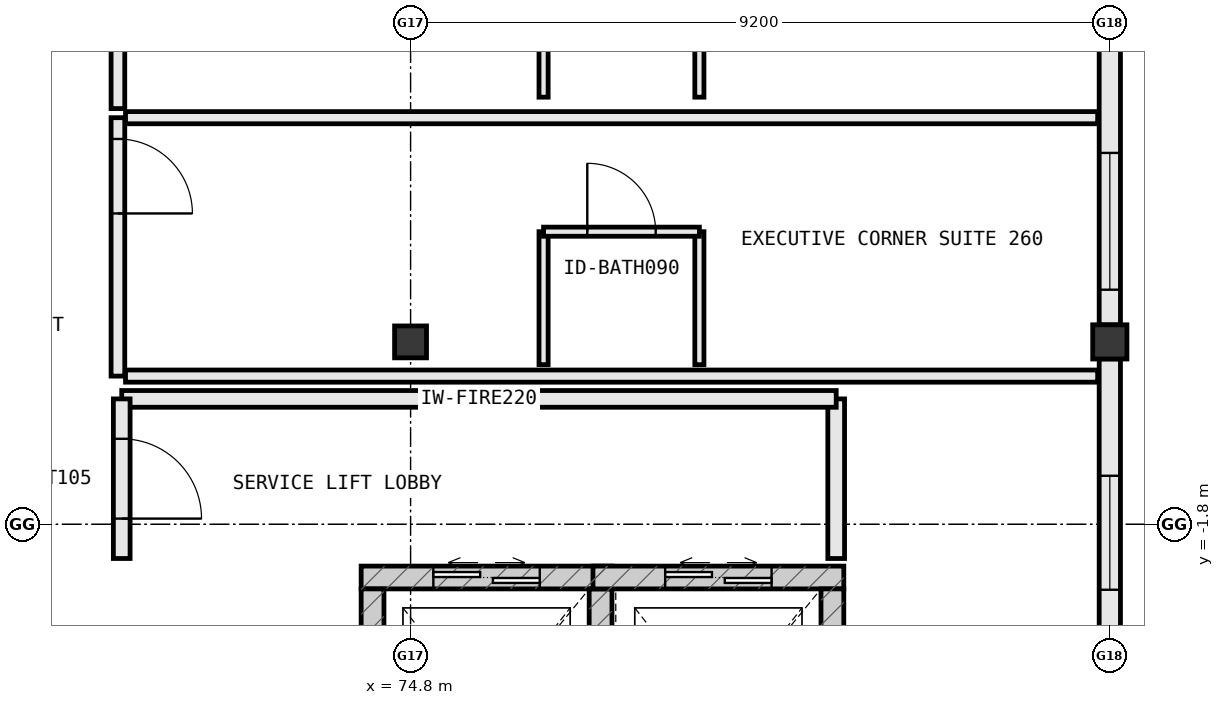
"""IFC4 building model, lengths in metres.
Left out: names, types, materials, properties, quantities, classifications, styles, units other than length and angle.
Written with IfcOpenShell. Run it as: python <this file> out.ifc"""

import sys

from ifc_helpers import new_model, si_unit, direction, frame, frame_2d, origin, origin_2d, place, context, subcontext, project, spatial, rectangle, extrude, element, fill, save


model = new_model("IFC4")
c1 = context("Model", 3, precision=1e-05, world=origin(), true_north=direction((0.0, 1.0)))
c2 = subcontext(c1, "Body", "Model", "MODEL_VIEW")
j1 = project(units=[si_unit("LENGTHUNIT", "METRE"), si_unit("PLANEANGLEUNIT", "RADIAN")], contexts=[c1])
p1 = place(None, origin())
s1 = spatial("IfcSite", under=j1, at=p1, CompositionType="ELEMENT")
p2 = place(p1, origin())
s2 = spatial("IfcBuilding", under=s1, at=p2, CompositionType="ELEMENT")
p3 = place(p2, frame((0.0, 0.0, 39.0)))
s3 = spatial("IfcBuildingStorey", under=s2, at=p3, CompositionType="ELEMENT", Elevation=39.0)
p4 = place(p3, frame((74.8, 0.6, 0.0), z_axis=(0.0, 0.0, 1.0), x_axis=(1.0, 0.0, 0.0)))
e1 = element("IfcColumn", 1, at=p4, inside=s3, PredefinedType="COLUMN", context=c2, shape_type="SweptSolid", body=[
    extrude(rectangle(XDim=0.42, YDim=0.42, at=origin_2d()), origin(), (0.0, 0.0, 1.0), 3.8),
])
p5 = place(p3, frame((84.0, 0.6, 0.0), z_axis=(0.0, 0.0, 1.0), x_axis=(1.0, 0.0, 0.0)))
e2 = element("IfcColumn", 2, at=p5, inside=s3, PredefinedType="COLUMN", context=c2, shape_type="SweptSolid", body=[
    extrude(rectangle(XDim=0.45, YDim=0.45, at=origin_2d()), origin(), (0.0, 0.0, 1.0), 3.8),
])
p6 = place(p3, frame((84.0, -8.777, 0.0), z_axis=(0.0, 0.0, 1.0), x_axis=(0.0, 1.0, 0.0)))
e3 = element("IfcWall", 3, at=p6, inside=s3, PredefinedType="STANDARD", context=c2, shape_type="SweptSolid", body=[
    extrude(rectangle(XDim=9.154, YDim=0.28, at=frame_2d((4.577, 0.0))), origin(), (0.0, 0.0, 1.0), 2.98),
])
p7 = place(p6, frame((1.539, 0.0, 0.85)))
e4 = element("IfcOpeningElement", 4, at=p7, cuts=e3, PredefinedType="OPENING", context=c2, shape_type="SweptSolid", body=[
    extrude(rectangle(XDim=1.5, YDim=1.75, at=frame_2d((0.75, 0.875))), frame((0.0, 0.152, 0.0), z_axis=(0.0, -1.0, 0.0), x_axis=(1.0, 0.0, 0.0)), (0.0, 0.0, 1.0), 0.304),
])
p8 = place(p6, frame((6.115, 0.0, 0.85)))
e5 = element("IfcOpeningElement", 5, at=p8, cuts=e3, PredefinedType="OPENING", context=c2, shape_type="SweptSolid", body=[
    extrude(rectangle(XDim=1.5, YDim=1.75, at=frame_2d((0.75, 0.875))), frame((0.0, 0.152, 0.0), z_axis=(0.0, -1.0, 0.0), x_axis=(1.0, 0.0, 0.0)), (0.0, 0.0, 1.0), 0.304),
])
p9 = place(p3, frame((84.0, 0.823, 0.0), z_axis=(0.0, 0.0, 1.0), x_axis=(0.0, 1.0, 0.0)))
e6 = element("IfcWall", 6, at=p9, inside=s3, PredefinedType="STANDARD", context=c2, shape_type="SweptSolid", body=[
    extrude(rectangle(XDim=9.154, YDim=0.28, at=frame_2d((4.577, 0.0))), origin(), (0.0, 0.0, 1.0), 2.98),
])
p10 = place(p9, frame((0.463, 0.0, 0.85)))
e7 = element("IfcOpeningElement", 7, at=p10, cuts=e6, PredefinedType="OPENING", context=c2, shape_type="SweptSolid", body=[
    extrude(rectangle(XDim=1.8, YDim=1.85, at=frame_2d((0.9, 0.925))), frame((0.0, 0.152, 0.0), z_axis=(0.0, -1.0, 0.0), x_axis=(1.0, 0.0, 0.0)), (0.0, 0.0, 1.0), 0.304),
])
p11 = place(p9, frame((3.647, 0.0, 0.85)))
e8 = element("IfcOpeningElement", 8, at=p11, cuts=e6, PredefinedType="OPENING", context=c2, shape_type="SweptSolid", body=[
    extrude(rectangle(XDim=1.8, YDim=1.85, at=frame_2d((0.9, 0.925))), frame((0.0, 0.152, 0.0), z_axis=(0.0, -1.0, 0.0), x_axis=(1.0, 0.0, 0.0)), (0.0, 0.0, 1.0), 0.304),
])
p12 = place(p9, frame((6.861, 0.0, 0.85)))
e9 = element("IfcOpeningElement", 9, at=p12, cuts=e6, PredefinedType="OPENING", context=c2, shape_type="SweptSolid", body=[
    extrude(rectangle(XDim=1.8, YDim=1.85, at=frame_2d((0.9, 0.925))), frame((0.0, 0.152, 0.0), z_axis=(0.0, -1.0, 0.0), x_axis=(1.0, 0.0, 0.0)), (0.0, 0.0, 1.0), 0.304),
])
p13 = place(p3, frame((77.45, -2.5, 0.0), z_axis=(0.0, 0.0, 1.0), x_axis=(-1.0, 0.0, 0.0)))
e10 = element("IfcWall", 10, at=p13, inside=s3, PredefinedType="SHEAR", context=c2, shape_type="SweptSolid", body=[
    extrude(rectangle(XDim=3.3, YDim=0.3, at=frame_2d((1.65, 0.0))), origin(), (0.0, 0.0, 1.0), 3.8),
])
p14 = place(p13, frame((0.95, 0.0, 0.0)))
e11 = element("IfcOpeningElement", 11, at=p14, cuts=e10, PredefinedType="OPENING", context=c2, shape_type="SweptSolid", body=[
    extrude(rectangle(XDim=1.4, YDim=2.2, at=frame_2d((0.7, 1.1))), frame((0.0, 0.162, 0.0), z_axis=(0.0, -1.0, 0.0), x_axis=(1.0, 0.0, 0.0)), (0.0, 0.0, 1.0), 0.324),
])
for number, where, z_axis, x_axis in (
    (12, (77.3, -5.95, 0.0), (0.0, 0.0, 1.0), (0.0, 1.0, 0.0)),
    (13, (74.3, -2.65, 0.0), (0.0, 0.0, 1.0), (0.0, -1.0, 0.0)),
):
    element("IfcWall", number, at=place(p3, frame(where, z_axis=z_axis, x_axis=x_axis)), inside=s3, PredefinedType="SHEAR", context=c2, shape_type="SweptSolid", body=[
        extrude(rectangle(XDim=3.3, YDim=0.3, at=frame_2d((1.65, 0.0))), origin(), (0.0, 0.0, 1.0), 3.8),
    ])
p15 = place(p3, frame((80.5, -2.5, 0.0), z_axis=(0.0, 0.0, 1.0), x_axis=(-1.0, 0.0, 0.0)))
e14 = element("IfcWall", 14, at=p15, inside=s3, PredefinedType="SHEAR", context=c2, shape_type="SweptSolid", body=[
    extrude(rectangle(XDim=3.3, YDim=0.3, at=frame_2d((1.65, 0.0))), origin(), (0.0, 0.0, 1.0), 3.8),
])
p16 = place(p15, frame((0.95, 0.0, 0.0)))
e15 = element("IfcOpeningElement", 15, at=p16, cuts=e14, PredefinedType="OPENING", context=c2, shape_type="SweptSolid", body=[
    extrude(rectangle(XDim=1.4, YDim=2.2, at=frame_2d((0.7, 1.1))), frame((0.0, 0.162, 0.0), z_axis=(0.0, -1.0, 0.0), x_axis=(1.0, 0.0, 0.0)), (0.0, 0.0, 1.0), 0.324),
])
p17 = place(p3, frame((80.35, -5.95, 0.0), z_axis=(0.0, 0.0, 1.0), x_axis=(0.0, 1.0, 0.0)))
e16 = element("IfcWall", 16, at=p17, inside=s3, PredefinedType="SHEAR", context=c2, shape_type="SweptSolid", body=[
    extrude(rectangle(XDim=3.3, YDim=0.3, at=frame_2d((1.65, 0.0))), origin(), (0.0, 0.0, 1.0), 3.8),
])
p18 = place(p3, frame((80.4, -2.25, 0.0), z_axis=(0.0, 0.0, 1.0), x_axis=(0.0, 1.0, 0.0)))
e17 = element("IfcWall", 17, at=p18, inside=s3, PredefinedType="STANDARD", context=c2, shape_type="SweptSolid", body=[
    extrude(rectangle(XDim=2.1, YDim=0.22, at=frame_2d((1.05, 0.0))), origin(), (0.0, 0.0, 1.0), 3.565),
])
p19 = place(p3, frame((80.4, -0.15, 0.0), z_axis=(0.0, 0.0, 1.0), x_axis=(-1.0, 0.0, 0.0)))
e18 = element("IfcWall", 18, at=p19, inside=s3, PredefinedType="STANDARD", context=c2, shape_type="SweptSolid", body=[
    extrude(rectangle(XDim=9.4, YDim=0.22, at=frame_2d((4.7, 0.0))), origin(), (0.0, 0.0, 1.0), 3.565),
])
p20 = place(p3, frame((71.0, -0.15, 0.0), z_axis=(0.0, 0.0, 1.0), x_axis=(0.0, -1.0, 0.0)))
e19 = element("IfcWall", 19, at=p20, inside=s3, PredefinedType="STANDARD", context=c2, shape_type="SweptSolid", body=[
    extrude(rectangle(XDim=2.1, YDim=0.22, at=frame_2d((1.05, 0.0))), origin(), (0.0, 0.0, 1.0), 3.565),
])
p21 = place(p20, frame((0.525, 0.0, 0.0)))
e20 = element("IfcOpeningElement", 20, at=p21, cuts=e19, PredefinedType="OPENING", context=c2, shape_type="SweptSolid", body=[
    extrude(rectangle(XDim=1.05, YDim=2.2, at=frame_2d((0.525, 1.1))), frame((0.0, 0.122, 0.0), z_axis=(0.0, -1.0, 0.0), x_axis=(1.0, 0.0, 0.0)), (0.0, 0.0, 1.0), 0.244),
])
p22 = place(p3, frame((70.95, 3.55, 0.0), z_axis=(0.0, 0.0, 1.0), x_axis=(0.0, -1.0, 0.0)))
e21 = element("IfcWall", 21, at=p22, inside=s3, PredefinedType="PARTITIONING", context=c2, shape_type="SweptSolid", body=[
    extrude(rectangle(XDim=3.4, YDim=0.18, at=frame_2d((1.7, 0.0))), origin(), (0.0, 0.0, 1.0), 3.565),
])
p23 = place(p22, frame((0.28, 0.0, 0.0)))
e22 = element("IfcOpeningElement", 22, at=p23, cuts=e21, PredefinedType="OPENING", context=c2, shape_type="SweptSolid", body=[
    extrude(rectangle(XDim=0.98, YDim=2.18, at=frame_2d((0.49, 1.09))), frame((0.0, 0.102, 0.0), z_axis=(0.0, -1.0, 0.0), x_axis=(1.0, 0.0, 0.0)), (0.0, 0.0, 1.0), 0.204),
])
for number, where, z_axis, x_axis in (
    (23, (71.05, 0.15, 0.0), (0.0, 0.0, 1.0), (1.0, 0.0, 0.0)),
    (24, (71.05, 3.55, 0.0), (0.0, 0.0, 1.0), (1.0, 0.0, 0.0)),
):
    element("IfcWall", number, at=place(p3, frame(where, z_axis=z_axis, x_axis=x_axis)), inside=s3, PredefinedType="PARTITIONING", context=c2, shape_type="SweptSolid", body=[
        extrude(rectangle(XDim=12.79, YDim=0.16, at=frame_2d((6.395, 0.0))), origin(), (0.0, 0.0, 1.0), 3.565),
    ])
for number, where, z_axis, x_axis in (
    (25, (76.55, 0.3, 0.0), (0.0, 0.0, 1.0), (0.0, 1.0, 0.0)),
    (26, (78.6, 0.3, 0.0), (0.0, 0.0, 1.0), (0.0, 1.0, 0.0)),
):
    element("IfcWall", number, at=place(p3, frame(where, z_axis=z_axis, x_axis=x_axis)), inside=s3, PredefinedType="PARTITIONING", context=c2, shape_type="SweptSolid", body=[
        extrude(rectangle(XDim=1.75, YDim=0.12, at=frame_2d((0.875, 0.0))), origin(), (0.0, 0.0, 1.0), 3.565),
    ])
p24 = place(p3, frame((76.55, 2.05, 0.0), z_axis=(0.0, 0.0, 1.0), x_axis=(1.0, 0.0, 0.0)))
e27 = element("IfcWall", 27, at=p24, inside=s3, PredefinedType="PARTITIONING", context=c2, shape_type="SweptSolid", body=[
    extrude(rectangle(XDim=2.05, YDim=0.12, at=frame_2d((1.025, 0.0))), origin(), (0.0, 0.0, 1.0), 3.565),
])
p25 = place(p24, frame((0.575, 0.0, 0.0)))
e28 = element("IfcOpeningElement", 28, at=p25, cuts=e27, PredefinedType="OPENING", context=c2, shape_type="SweptSolid", body=[
    extrude(rectangle(XDim=0.9, YDim=2.15, at=frame_2d((0.45, 1.075))), frame((0.0, 0.072, 0.0), z_axis=(0.0, -1.0, 0.0), x_axis=(1.0, 0.0, 0.0)), (0.0, 0.0, 1.0), 0.144),
])
p26 = place(p3, frame((70.95, 7.07, 0.0), z_axis=(0.0, 0.0, 1.0), x_axis=(0.0, -1.0, 0.0)))
e29 = element("IfcWall", 29, at=p26, inside=s3, PredefinedType="PARTITIONING", context=c2, shape_type="SweptSolid", body=[
    extrude(rectangle(XDim=3.4, YDim=0.18, at=frame_2d((1.7, 0.0))), origin(), (0.0, 0.0, 1.0), 3.565),
])
p27 = place(p26, frame((0.28, 0.0, 0.0)))
e30 = element("IfcOpeningElement", 30, at=p27, cuts=e29, PredefinedType="OPENING", context=c2, shape_type="SweptSolid", body=[
    extrude(rectangle(XDim=0.98, YDim=2.18, at=frame_2d((0.49, 1.09))), frame((0.0, 0.102, 0.0), z_axis=(0.0, -1.0, 0.0), x_axis=(1.0, 0.0, 0.0)), (0.0, 0.0, 1.0), 0.204),
])
for number, where, z_axis, x_axis in (
    (31, (76.55, 3.82, 0.0), (0.0, 0.0, 1.0), (0.0, 1.0, 0.0)),
    (32, (78.6, 3.82, 0.0), (0.0, 0.0, 1.0), (0.0, 1.0, 0.0)),
):
    element("IfcWall", number, at=place(p3, frame(where, z_axis=z_axis, x_axis=x_axis)), inside=s3, PredefinedType="PARTITIONING", context=c2, shape_type="SweptSolid", body=[
        extrude(rectangle(XDim=1.75, YDim=0.12, at=frame_2d((0.875, 0.0))), origin(), (0.0, 0.0, 1.0), 3.565),
    ])
p28 = place(p8, origin())
e33 = element("IfcWindow", 33, at=p28, inside=s3, PartitioningType="SINGLE_PANEL", PredefinedType="WINDOW", context=c2, shape_type="SweptSolid", body=[
    extrude(rectangle(XDim=1.5, YDim=1.75, at=frame_2d((0.75, 0.875))), frame((0.0, 0.03, 0.0), z_axis=(0.0, -1.0, 0.0), x_axis=(1.0, 0.0, 0.0)), (0.0, 0.0, 1.0), 0.06),
])
fill(e5, e33)
p29 = place(p10, origin())
e34 = element("IfcWindow", 34, at=p29, inside=s3, PartitioningType="SINGLE_PANEL", PredefinedType="WINDOW", context=c2, shape_type="SweptSolid", body=[
    extrude(rectangle(XDim=1.8, YDim=1.85, at=frame_2d((0.9, 0.925))), frame((0.0, 0.03, 0.0), z_axis=(0.0, -1.0, 0.0), x_axis=(1.0, 0.0, 0.0)), (0.0, 0.0, 1.0), 0.06),
])
fill(e7, e34)
p30 = place(p14, origin())
e35 = element("IfcDoor", 35, at=p30, inside=s3, OperationType="DOUBLE_DOOR_SLIDING", PredefinedType="DOOR", context=c2, shape_type="SweptSolid", body=[
    extrude(rectangle(XDim=1.4, YDim=2.2, at=frame_2d((0.7, 1.1))), frame((0.0, 0.025, 0.0), z_axis=(0.0, -1.0, 0.0), x_axis=(1.0, 0.0, 0.0)), (0.0, 0.0, 1.0), 0.05),
])
fill(e11, e35)
p31 = place(p16, origin())
e36 = element("IfcDoor", 36, at=p31, inside=s3, OperationType="DOUBLE_DOOR_SLIDING", PredefinedType="DOOR", context=c2, shape_type="SweptSolid", body=[
    extrude(rectangle(XDim=1.4, YDim=2.2, at=frame_2d((0.7, 1.1))), frame((0.0, 0.025, 0.0), z_axis=(0.0, -1.0, 0.0), x_axis=(1.0, 0.0, 0.0)), (0.0, 0.0, 1.0), 0.05),
])
fill(e15, e36)
p32 = place(p21, origin())
e37 = element("IfcDoor", 37, at=p32, inside=s3, OperationType="SINGLE_SWING_RIGHT", PredefinedType="DOOR", context=c2, shape_type="SweptSolid", body=[
    extrude(rectangle(XDim=1.05, YDim=2.2, at=frame_2d((0.525, 1.1))), frame((0.0, 0.025, 0.0), z_axis=(0.0, -1.0, 0.0), x_axis=(1.0, 0.0, 0.0)), (0.0, 0.0, 1.0), 0.05),
])
fill(e20, e37)
p33 = place(p23, origin())
e38 = element("IfcDoor", 38, at=p33, inside=s3, OperationType="SINGLE_SWING_RIGHT", PredefinedType="DOOR", context=c2, shape_type="SweptSolid", body=[
    extrude(rectangle(XDim=0.98, YDim=2.18, at=frame_2d((0.49, 1.09))), frame((0.0, 0.025, 0.0), z_axis=(0.0, -1.0, 0.0), x_axis=(1.0, 0.0, 0.0)), (0.0, 0.0, 1.0), 0.05),
])
fill(e22, e38)
p34 = place(p25, origin())
e39 = element("IfcDoor", 39, at=p34, inside=s3, OperationType="SINGLE_SWING_LEFT", PredefinedType="DOOR", context=c2, shape_type="SweptSolid", body=[
    extrude(rectangle(XDim=0.9, YDim=2.15, at=frame_2d((0.45, 1.075))), frame((0.0, 0.025, 0.0), z_axis=(0.0, -1.0, 0.0), x_axis=(1.0, 0.0, 0.0)), (0.0, 0.0, 1.0), 0.05),
])
fill(e28, e39)
save(model, sys.argv[1])
